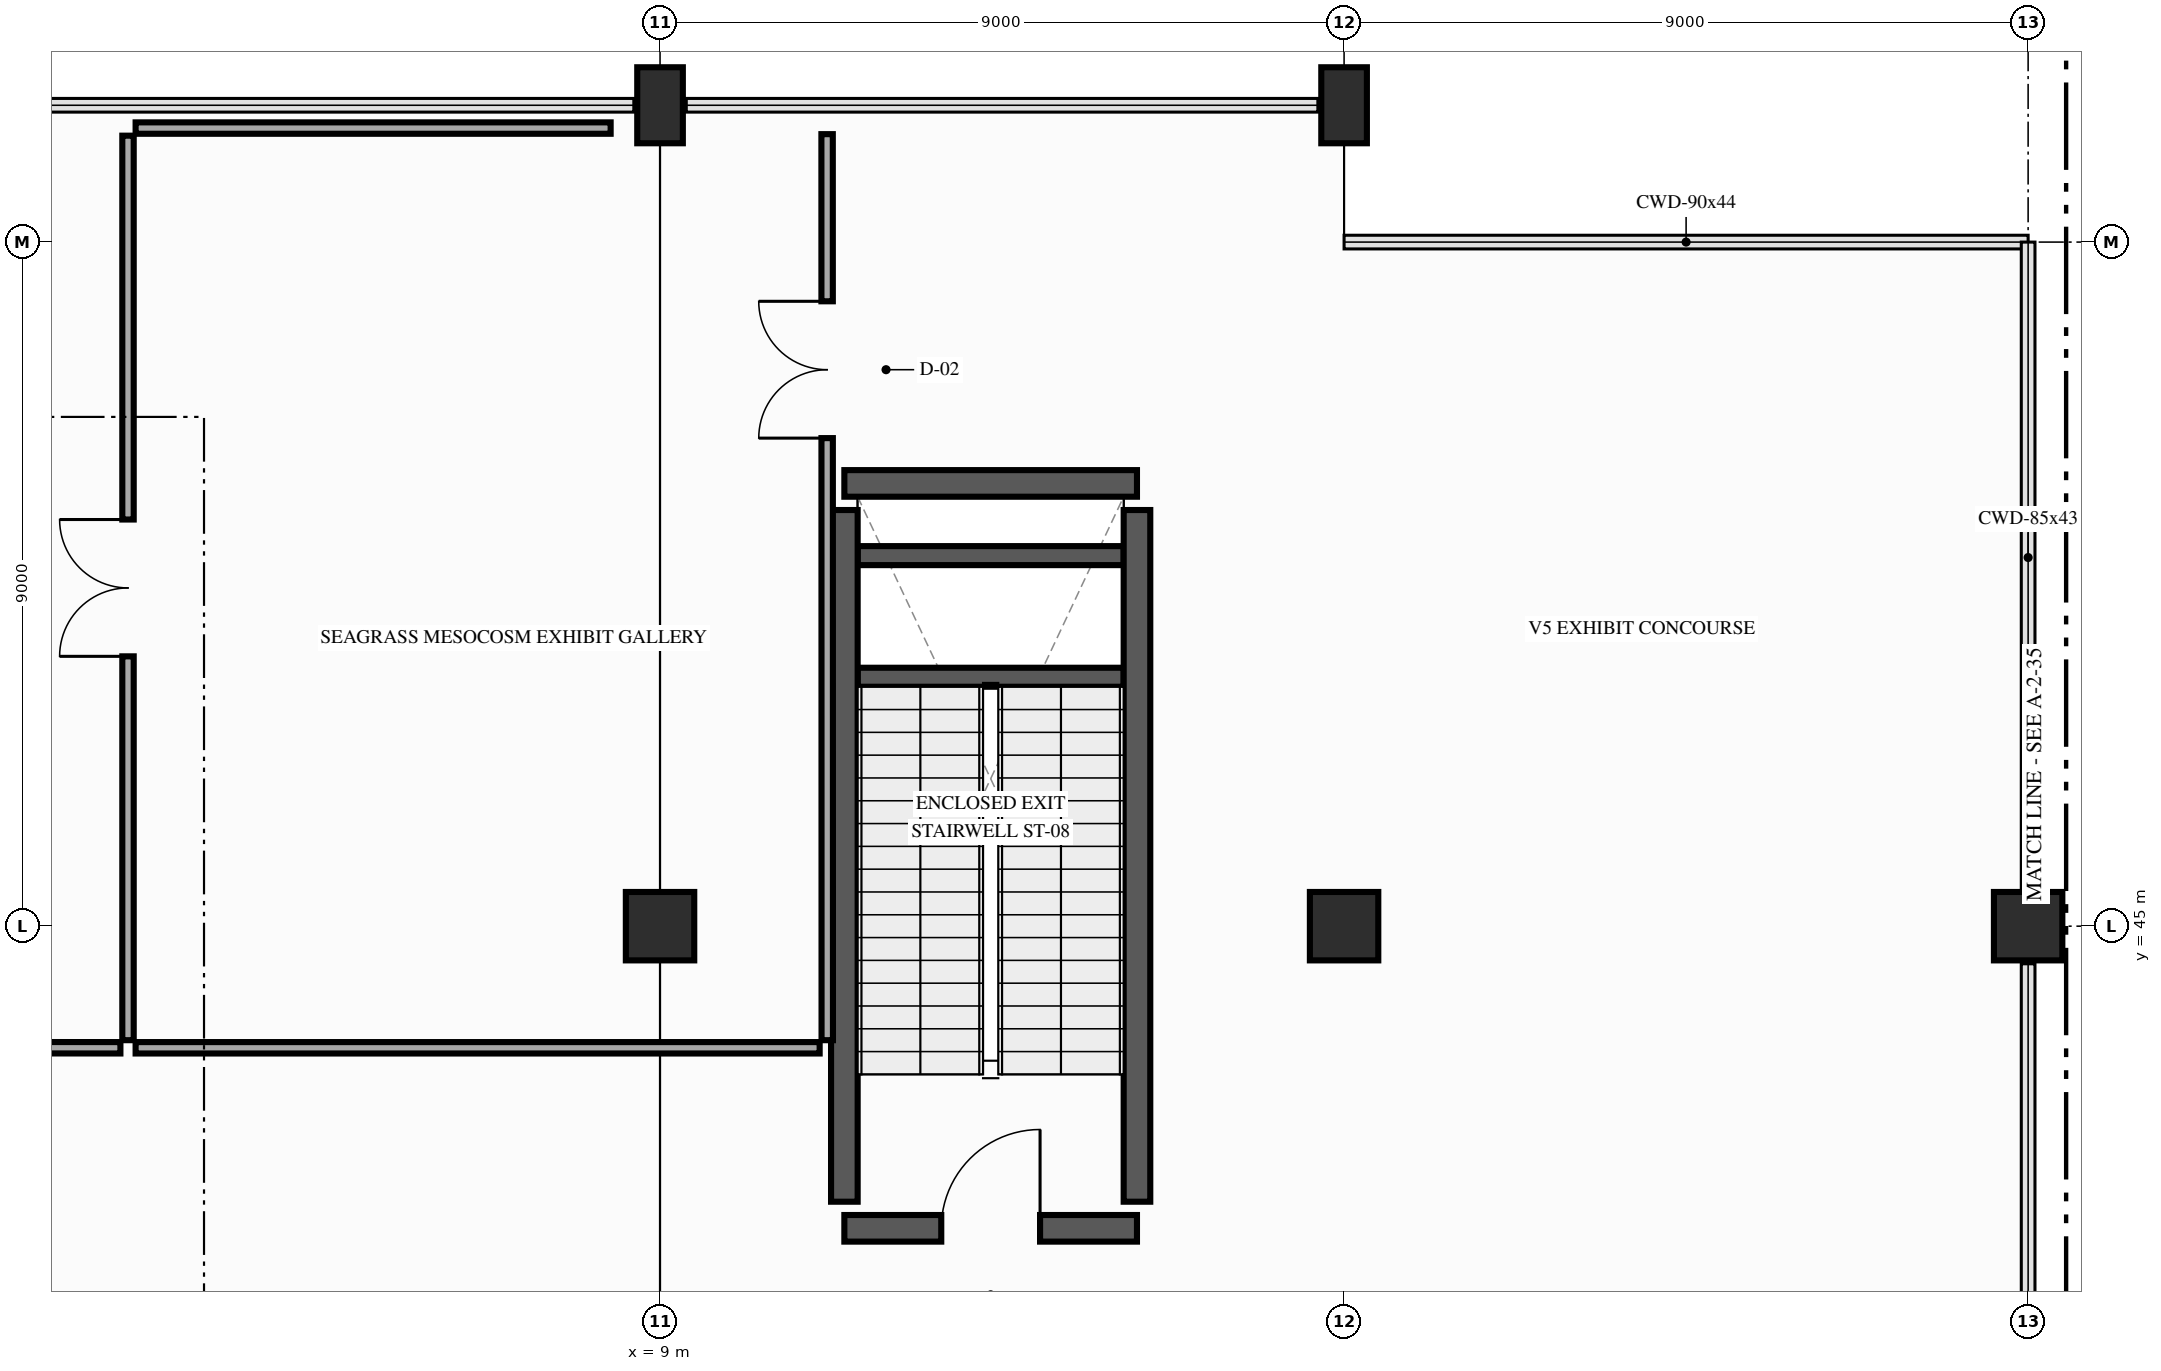
"""IFC4 building model, lengths in metres.
Left out: names, types, materials, properties, quantities, classifications, styles, units other than length and angle.
Written with IfcOpenShell. Run it as: python <this file> out.ifc"""

import sys

from ifc_helpers import new_model, si_unit, direction, frame, frame_2d, origin, origin_2d, place, context, subcontext, project, spatial, rectangle, extrude, element, fill, save


model = new_model("IFC4")
c1 = context("Model", 3, precision=1e-05, world=origin(), true_north=direction((0.0, 1.0)))
c2 = subcontext(c1, "Body", "Model", "MODEL_VIEW")
j1 = project(units=[si_unit("LENGTHUNIT", "METRE"), si_unit("PLANEANGLEUNIT", "RADIAN")], contexts=[c1])
p1 = place(None, origin())
s1 = spatial("IfcSite", under=j1, at=p1, CompositionType="ELEMENT")
p2 = place(p1, origin())
s2 = spatial("IfcBuilding", under=s1, at=p2, CompositionType="ELEMENT")
p3 = place(p2, frame((0.0, 0.0, 10.8)))
s3 = spatial("IfcBuildingStorey", under=s2, at=p3, CompositionType="ELEMENT", Elevation=10.8)
p4 = place(p3, frame((9.0, 45.0, 0.0), z_axis=(0.0, 0.0, 1.0), x_axis=(1.0, 0.0, 0.0)))
e1 = element("IfcColumn", 1, at=p4, inside=s3, PredefinedType="COLUMN", context=c2, shape_type="SweptSolid", body=[
    extrude(rectangle(XDim=0.9, YDim=0.9, at=origin_2d()), origin(), (0.0, 0.0, 1.0), 5.4),
])
p5 = place(p3, frame((9.0, 55.8, 0.0), z_axis=(0.0, 0.0, 1.0), x_axis=(1.0, 0.0, 0.0)))
e2 = element("IfcColumn", 2, at=p5, inside=s3, PredefinedType="PILASTER", context=c2, shape_type="SweptSolid", body=[
    extrude(rectangle(XDim=0.6, YDim=1.0, at=origin_2d()), origin(), (0.0, 0.0, 1.0), 5.4),
])
p6 = place(p3, frame((18.0, 45.0, 0.0), z_axis=(0.0, 0.0, 1.0), x_axis=(1.0, 0.0, 0.0)))
e3 = element("IfcColumn", 3, at=p6, inside=s3, PredefinedType="COLUMN", context=c2, shape_type="SweptSolid", body=[
    extrude(rectangle(XDim=0.9, YDim=0.9, at=origin_2d()), origin(), (0.0, 0.0, 1.0), 5.4),
])
p7 = place(p3, frame((18.0, 55.8, 0.0), z_axis=(0.0, 0.0, 1.0), x_axis=(1.0, 0.0, 0.0)))
e4 = element("IfcColumn", 4, at=p7, inside=s3, PredefinedType="PILASTER", context=c2, shape_type="SweptSolid", body=[
    extrude(rectangle(XDim=0.6, YDim=1.0, at=origin_2d()), origin(), (0.0, 0.0, 1.0), 5.4),
])
p8 = place(p3, frame((27.0, 45.0, 0.0), z_axis=(0.0, 0.0, 1.0), x_axis=(1.0, 0.0, 0.0)))
e5 = element("IfcColumn", 5, at=p8, inside=s3, PredefinedType="COLUMN", context=c2, shape_type="SweptSolid", body=[
    extrude(rectangle(XDim=0.9, YDim=0.9, at=origin_2d()), origin(), (0.0, 0.0, 1.0), 5.4),
])
for number, where, z_axis, x_axis in (
    (6, (11.6, 48.275, 0.0), (0.0, 0.0, 1.0), (1.0, 0.0, 0.0)),
    (7, (11.6, 49.875, 0.0), (0.0, 0.0, 1.0), (1.0, 0.0, 0.0)),
):
    element("IfcWall", number, at=place(p3, frame(where, z_axis=z_axis, x_axis=x_axis)), inside=s3, PredefinedType="SHEAR", context=c2, shape_type="SweptSolid", body=[
        extrude(rectangle(XDim=3.5, YDim=0.25, at=frame_2d((1.75, 0.0))), origin(), (0.0, 0.0, 1.0), 2.5),
    ])
p9 = place(p3, frame((11.425, 41.025, 0.0), z_axis=(0.0, 0.0, 1.0), x_axis=(1.0, 0.0, 0.0)))
e8 = element("IfcWall", 8, at=p9, inside=s3, PredefinedType="SHEAR", context=c2, shape_type="SweptSolid", body=[
    extrude(rectangle(XDim=3.85, YDim=0.35, at=frame_2d((1.925, 0.0))), origin(), (0.0, 0.0, 1.0), 5.16),
])
p10 = place(p9, frame((1.275, 0.0, 0.0)))
e9 = element("IfcOpeningElement", 9, at=p10, cuts=e8, PredefinedType="OPENING", context=c2, shape_type="SweptSolid", body=[
    extrude(rectangle(XDim=1.3, YDim=2.2, at=frame_2d((0.65, 1.1))), frame((0.0, 0.185, 0.0), z_axis=(0.0, -1.0, 0.0), x_axis=(1.0, 0.0, 0.0)), (0.0, 0.0, 1.0), 0.37),
])
p11 = place(p3, frame((11.425, 50.825, 0.0), z_axis=(0.0, 0.0, 1.0), x_axis=(1.0, 0.0, 0.0)))
e10 = element("IfcWall", 10, at=p11, inside=s3, PredefinedType="SHEAR", context=c2, shape_type="SweptSolid", body=[
    extrude(rectangle(XDim=3.85, YDim=0.35, at=frame_2d((1.925, 0.0))), origin(), (0.0, 0.0, 1.0), 5.16),
])
for number, where, z_axis, x_axis in (
    (11, (11.425, 41.375, 0.0), (0.0, 0.0, 1.0), (0.0, 1.0, 0.0)),
    (12, (15.275, 41.375, 0.0), (0.0, 0.0, 1.0), (0.0, 1.0, 0.0)),
):
    element("IfcWall", number, at=place(p3, frame(where, z_axis=z_axis, x_axis=x_axis)), inside=s3, PredefinedType="SHEAR", context=c2, shape_type="SweptSolid", body=[
        extrude(rectangle(XDim=9.1, YDim=0.35, at=frame_2d((4.55, 0.0))), origin(), (0.0, 0.0, 1.0), 5.16),
    ])
p12 = place(p3, frame((-2.325, 43.403, 0.0), z_axis=(0.0, 0.0, 1.0), x_axis=(0.999999717828, -0.000751227757, 0.0)))
e13 = element("IfcWall", 13, at=p12, inside=s3, PredefinedType="PARTITIONING", context=c2, shape_type="SweptSolid", body=[
    extrude(rectangle(XDim=4.225, YDim=0.15, at=frame_2d((2.112, 0.0))), origin(), (0.0, 0.0, 1.0), 4.445),
])
p13 = place(p3, frame((2.0, 43.5, 0.0), z_axis=(0.0, 0.0, 1.0), x_axis=(0.0, 1.0, 0.0)))
e14 = element("IfcWall", 14, at=p13, inside=s3, PredefinedType="PARTITIONING", context=c2, shape_type="SweptSolid", body=[
    extrude(rectangle(XDim=11.9, YDim=0.15, at=frame_2d((5.95, 0.0))), origin(), (0.0, 0.0, 1.0), 4.395),
])
p14 = place(p13, frame((5.05, 0.0, 0.0)))
e15 = element("IfcOpeningElement", 15, at=p14, cuts=e14, PredefinedType="OPENING", context=c2, shape_type="SweptSolid", body=[
    extrude(rectangle(XDim=1.8, YDim=2.3, at=frame_2d((0.9, 1.15))), frame((0.0, 0.085, 0.0), z_axis=(0.0, -1.0, 0.0), x_axis=(1.0, 0.0, 0.0)), (0.0, 0.0, 1.0), 0.17),
])
p15 = place(p3, frame((8.35, 55.5, 0.0), z_axis=(0.0, 0.0, 1.0), x_axis=(-1.0, 0.0, 0.0)))
e16 = element("IfcWall", 16, at=p15, inside=s3, PredefinedType="PARTITIONING", context=c2, shape_type="SweptSolid", body=[
    extrude(rectangle(XDim=6.25, YDim=0.15, at=frame_2d((3.125, 0.0))), origin(), (0.0, 0.0, 1.0), 4.395),
])
p16 = place(p3, frame((2.1, 43.4, 0.0), z_axis=(0.0, 0.0, 1.0), x_axis=(1.0, 0.0, 0.0)))
e17 = element("IfcWall", 17, at=p16, inside=s3, PredefinedType="PARTITIONING", context=c2, shape_type="SweptSolid", body=[
    extrude(rectangle(XDim=9.0, YDim=0.15, at=frame_2d((4.5, 0.0))), origin(), (0.0, 0.0, 1.0), 4.445),
])
p17 = place(p3, frame((11.2, 43.5, 0.0), z_axis=(0.0, 0.0, 1.0), x_axis=(-0.00016385384, 0.999999986576, 0.0)))
e18 = element("IfcWall", 18, at=p17, inside=s3, PredefinedType="PARTITIONING", context=c2, shape_type="SweptSolid", body=[
    extrude(rectangle(XDim=11.92, YDim=0.15, at=frame_2d((5.96, 0.0))), origin(), (0.0, 0.0, 1.0), 4.395),
])
p18 = place(p17, frame((7.921, 0.0, 0.0)))
e19 = element("IfcOpeningElement", 19, at=p18, cuts=e18, PredefinedType="OPENING", context=c2, shape_type="SweptSolid", body=[
    extrude(rectangle(XDim=1.8, YDim=2.3, at=frame_2d((0.9, 1.15))), frame((0.0, 0.085, 0.0), z_axis=(0.0, -1.0, 0.0), x_axis=(1.0, 0.0, 0.0)), (0.0, 0.0, 1.0), 0.17),
])
p19 = place(p10, origin())
e20 = element("IfcDoor", 20, at=p19, inside=s3, OperationType="SINGLE_SWING_RIGHT", PredefinedType="DOOR", context=c2, shape_type="SweptSolid", body=[
    extrude(rectangle(XDim=1.3, YDim=2.2, at=frame_2d((0.65, 1.1))), frame((0.0, 0.025, 0.0), z_axis=(0.0, -1.0, 0.0), x_axis=(1.0, 0.0, 0.0)), (0.0, 0.0, 1.0), 0.05),
])
fill(e9, e20)
p20 = place(p14, origin())
e21 = element("IfcDoor", 21, at=p20, inside=s3, OperationType="DOUBLE_DOOR_SINGLE_SWING", PredefinedType="DOOR", context=c2, shape_type="SweptSolid", body=[
    extrude(rectangle(XDim=1.8, YDim=2.3, at=frame_2d((0.9, 1.15))), frame((0.0, 0.025, 0.0), z_axis=(0.0, -1.0, 0.0), x_axis=(1.0, 0.0, 0.0)), (0.0, 0.0, 1.0), 0.05),
])
fill(e15, e21)
p21 = place(p18, origin())
e22 = element("IfcDoor", 22, at=p21, inside=s3, OperationType="DOUBLE_DOOR_SINGLE_SWING", PredefinedType="DOOR", context=c2, shape_type="SweptSolid", body=[
    extrude(rectangle(XDim=1.8, YDim=2.3, at=frame_2d((0.9, 1.15))), frame((0.0, 0.025, 0.0), z_axis=(0.0, -1.0, 0.0), x_axis=(1.0, 0.0, 0.0)), (0.0, 0.0, 1.0), 0.05),
])
fill(e19, e22)
save(model, sys.argv[1])
